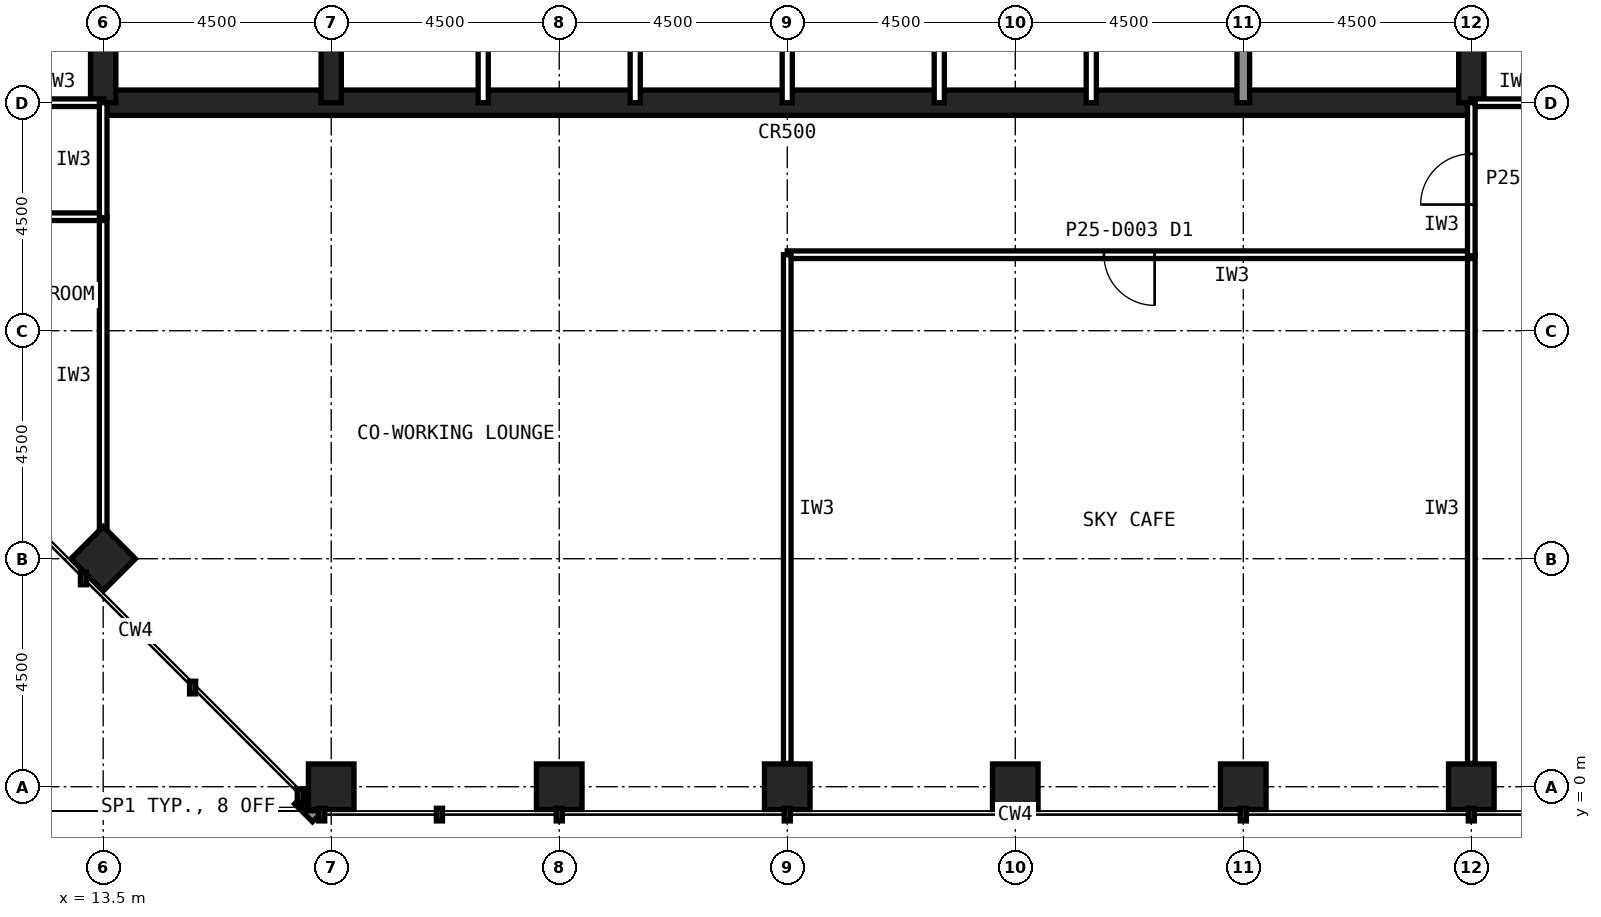
"""IFC4 building model, lengths in metres.
Left out: names, types, materials, properties, quantities, classifications, styles, units other than length and angle.
Written with IfcOpenShell. Run it as: python <this file> out.ifc"""

import sys

from ifc_helpers import new_model, si_unit, direction, frame, frame_2d, origin, origin_2d, place, context, subcontext, project, spatial, rectangle, hollow_rectangle, extrude, element, fill, save


model = new_model("IFC4")
c1 = context("Model", 3, precision=1e-05, world=origin(), true_north=direction((0.0, 1.0)))
c2 = subcontext(c1, "Body", "Model", "MODEL_VIEW")
j1 = project(units=[si_unit("LENGTHUNIT", "METRE"), si_unit("PLANEANGLEUNIT", "RADIAN")], contexts=[c1])
p1 = place(None, origin())
s1 = spatial("IfcSite", under=j1, at=p1, CompositionType="ELEMENT")
p2 = place(p1, origin())
s2 = spatial("IfcBuilding", under=s1, at=p2, CompositionType="ELEMENT")
p3 = place(p2, frame((0.0, 0.0, 110.6)))
s3 = spatial("IfcBuildingStorey", under=s2, at=p3, CompositionType="ELEMENT", Elevation=110.6)
for number, where, z_axis, x_axis in (
    (1, (18.0, 0.0, 0.0), (0.0, 0.0, 1.0), (1.0, 0.0, 0.0)),
    (2, (22.5, 0.0, 0.0), (0.0, 0.0, 1.0), (1.0, 0.0, 0.0)),
    (3, (27.0, 0.0, 0.0), (0.0, 0.0, 1.0), (1.0, 0.0, 0.0)),
    (4, (31.5, 0.0, 0.0), (0.0, 0.0, 1.0), (1.0, 0.0, 0.0)),
    (5, (36.0, 0.0, 0.0), (0.0, 0.0, 1.0), (1.0, 0.0, 0.0)),
    (6, (40.5, 0.0, 0.0), (0.0, 0.0, 1.0), (1.0, 0.0, 0.0)),
    (7, (13.5, 4.5, 0.0), (0.0, 0.0, 1.0), (0.707, 0.707, 0.0)),
):
    element("IfcColumn", number, at=place(p3, frame(where, z_axis=z_axis, x_axis=x_axis)), inside=s3, PredefinedType="COLUMN", context=c2, shape_type="SweptSolid", body=[
        extrude(hollow_rectangle(XDim=0.9, YDim=0.9, WallThickness=0.063, at=origin_2d()), origin(), (0.0, 0.0, 1.0), 5.0),
    ])
p4 = place(p3, frame((13.5, 13.5, 0.0), z_axis=(0.0, 0.0, 1.0), x_axis=(1.0, 0.0, 0.0)))
e8 = element("IfcWall", 8, at=p4, inside=s3, PredefinedType="SHEAR", context=c2, shape_type="SweptSolid", body=[
    extrude(rectangle(XDim=27.0, YDim=0.5, at=frame_2d((13.5, 0.0))), origin(), (0.0, 0.0, 1.0), 5.0),
])
p5 = place(p3, frame((40.5, 13.5, 0.0), z_axis=(0.0, 0.0, 1.0), x_axis=(0.0, 1.0, 0.0)))
e9 = element("IfcWall", 9, at=p5, inside=s3, PredefinedType="SHEAR", context=c2, shape_type="SweptSolid", body=[
    extrude(rectangle(XDim=27.0, YDim=0.5, at=frame_2d((13.5, 0.0))), origin(), (0.0, 0.0, 1.0), 5.0),
])
p6 = place(p5, frame((5.85, 0.0, 0.0)))
e10 = element("IfcOpeningElement", 10, at=p6, cuts=e9, PredefinedType="OPENING", context=c2, shape_type="SweptSolid", body=[
    extrude(rectangle(XDim=1.8, YDim=2.1, at=frame_2d((0.9, 1.05))), frame((0.0, 0.26, 0.0), z_axis=(0.0, -1.0, 0.0), x_axis=(1.0, 0.0, 0.0)), (0.0, 0.0, 1.0), 0.52),
])
p7 = place(p5, frame((19.65, 0.0, 0.0)))
e11 = element("IfcOpeningElement", 11, at=p7, cuts=e9, PredefinedType="OPENING", context=c2, shape_type="SweptSolid", body=[
    extrude(rectangle(XDim=1.2, YDim=2.1, at=frame_2d((0.6, 1.05))), frame((0.0, 0.26, 0.0), z_axis=(0.0, -1.0, 0.0), x_axis=(1.0, 0.0, 0.0)), (0.0, 0.0, 1.0), 0.52),
])
p8 = place(p3, frame((13.5, 40.5, 0.0), z_axis=(0.0, 0.0, 1.0), x_axis=(0.0, -1.0, 0.0)))
e12 = element("IfcWall", 12, at=p8, inside=s3, PredefinedType="SHEAR", context=c2, shape_type="SweptSolid", body=[
    extrude(rectangle(XDim=27.0, YDim=0.5, at=frame_2d((13.5, 0.0))), origin(), (0.0, 0.0, 1.0), 5.0),
])
p9 = place(p8, frame((19.65, 0.0, 0.0)))
e13 = element("IfcOpeningElement", 13, at=p9, cuts=e12, PredefinedType="OPENING", context=c2, shape_type="SweptSolid", body=[
    extrude(rectangle(XDim=1.2, YDim=2.1, at=frame_2d((0.6, 1.05))), frame((0.0, 0.26, 0.0), z_axis=(0.0, -1.0, 0.0), x_axis=(1.0, 0.0, 0.0)), (0.0, 0.0, 1.0), 0.52),
])
p10 = place(p8, frame((5.85, 0.0, 0.0)))
e14 = element("IfcOpeningElement", 14, at=p10, cuts=e12, PredefinedType="OPENING", context=c2, shape_type="SweptSolid", body=[
    extrude(rectangle(XDim=1.8, YDim=2.1, at=frame_2d((0.9, 1.05))), frame((0.0, 0.26, 0.0), z_axis=(0.0, -1.0, 0.0), x_axis=(1.0, 0.0, 0.0)), (0.0, 0.0, 1.0), 0.52),
])
p11 = place(p3, frame((18.0, 13.5, 0.0), z_axis=(0.0, 0.0, 1.0), x_axis=(0.0, 1.0, 0.0)))
e15 = element("IfcWall", 15, at=p11, inside=s3, PredefinedType="SHEAR", context=c2, shape_type="SweptSolid", body=[
    extrude(rectangle(XDim=18.0, YDim=0.4, at=frame_2d((9.0, 0.0))), origin(), (0.0, 0.0, 1.0), 5.0),
])
p12 = place(p3, frame((36.0, 13.5, 0.0), z_axis=(0.0, 0.0, 1.0), x_axis=(0.0, 1.0, 0.0)))
e16 = element("IfcWall", 16, at=p12, inside=s3, PredefinedType="SOLIDWALL", context=c2, shape_type="SweptSolid", body=[
    extrude(rectangle(XDim=4.5, YDim=0.25, at=frame_2d((2.25, 0.0))), origin(), (0.0, 0.0, 1.0), 4.84),
])
for number, where, z_axis, x_axis in (
    (17, (21.0, 13.5, 0.0), (0.0, 0.0, 1.0), (0.0, 1.0, 0.0)),
    (18, (24.0, 13.5, 0.0), (0.0, 0.0, 1.0), (0.0, 1.0, 0.0)),
    (19, (27.0, 13.5, 0.0), (0.0, 0.0, 1.0), (0.0, 1.0, 0.0)),
    (20, (30.0, 13.5, 0.0), (0.0, 0.0, 1.0), (0.0, 1.0, 0.0)),
    (21, (33.0, 13.5, 0.0), (0.0, 0.0, 1.0), (0.0, 1.0, 0.0)),
):
    element("IfcWall", number, at=place(p3, frame(where, z_axis=z_axis, x_axis=x_axis)), inside=s3, PredefinedType="PARTITIONING", context=c2, shape_type="SweptSolid", body=[
        extrude(rectangle(XDim=4.5, YDim=0.2, at=frame_2d((2.25, 0.0))), origin(), (0.0, 0.0, 1.0), 4.84),
    ])
for number, where, z_axis, x_axis in (
    (22, (11.7, 13.5, 0.0), (0.0, 0.0, 1.0), (1.0, 0.0, 0.0)),
    (23, (40.49, 13.5, 0.0), (0.0, 0.0, 1.0), (1.0, 0.0, 0.0)),
):
    element("IfcWall", number, at=place(p3, frame(where, z_axis=z_axis, x_axis=x_axis)), inside=s3, PredefinedType="PARTITIONING", context=c2, shape_type="SweptSolid", body=[
        extrude(rectangle(XDim=1.81, YDim=0.15, at=frame_2d((0.905, 0.0))), origin(), (0.0, 0.0, 1.0), 3.989),
    ])
p13 = place(p3, frame((40.5, 0.46, 0.0), z_axis=(0.0, 0.0, 1.0), x_axis=(0.0, 1.0, 0.0)))
e24 = element("IfcWall", 24, at=p13, inside=s3, PredefinedType="PARTITIONING", context=c2, shape_type="SweptSolid", body=[
    extrude(rectangle(XDim=10.04, YDim=0.15, at=frame_2d((5.02, 0.0))), origin(), (0.0, 0.0, 1.0), 3.989),
])
p14 = place(p3, frame((40.5, 10.5, 0.0), z_axis=(0.0, 0.0, 1.0), x_axis=(-1.0, 0.0, 0.0)))
e25 = element("IfcWall", 25, at=p14, inside=s3, PredefinedType="PARTITIONING", context=c2, shape_type="SweptSolid", body=[
    extrude(rectangle(XDim=13.5, YDim=0.15, at=frame_2d((6.75, 0.0))), origin(), (0.0, 0.0, 1.0), 4.84),
])
p15 = place(p14, frame((6.25, 0.0, 0.0)))
e26 = element("IfcOpeningElement", 26, at=p15, cuts=e25, PredefinedType="OPENING", context=c2, shape_type="SweptSolid", body=[
    extrude(rectangle(XDim=1.0, YDim=2.1, at=frame_2d((0.5, 1.05))), frame((0.0, 0.085, 0.0), z_axis=(0.0, -1.0, 0.0), x_axis=(1.0, 0.0, 0.0)), (0.0, 0.0, 1.0), 0.17),
])
p16 = place(p3, frame((27.0, 10.5, 0.0), z_axis=(0.0, 0.0, 1.0), x_axis=(0.0, -1.0, 0.0)))
e27 = element("IfcWall", 27, at=p16, inside=s3, PredefinedType="PARTITIONING", context=c2, shape_type="SweptSolid", body=[
    extrude(rectangle(XDim=10.04, YDim=0.15, at=frame_2d((5.02, 0.0))), origin(), (0.0, 0.0, 1.0), 3.989),
])
p17 = place(p3, frame((13.5, 4.96, 0.0), z_axis=(0.0, 0.0, 1.0), x_axis=(0.0, 1.0, 0.0)))
e28 = element("IfcWall", 28, at=p17, inside=s3, PredefinedType="PARTITIONING", context=c2, shape_type="SweptSolid", body=[
    extrude(rectangle(XDim=6.29, YDim=0.15, at=frame_2d((3.145, 0.0))), origin(), (0.0, 0.0, 1.0), 3.989),
])
p18 = place(p3, frame((13.5, 11.25, 0.0), z_axis=(0.0, 0.0, 1.0), x_axis=(-1.0, 0.0, 0.0)))
e29 = element("IfcWall", 29, at=p18, inside=s3, PredefinedType="PARTITIONING", context=c2, shape_type="SweptSolid", body=[
    extrude(rectangle(XDim=7.485, YDim=0.15, at=frame_2d((3.743, 0.0))), origin(), (0.0, 0.0, 1.0), 4.84),
])
p19 = place(p18, frame((2.868, 0.0, 0.0)))
e30 = element("IfcOpeningElement", 30, at=p19, cuts=e29, PredefinedType="OPENING", context=c2, shape_type="SweptSolid", body=[
    extrude(rectangle(XDim=1.0, YDim=2.1, at=frame_2d((0.5, 1.05))), frame((0.0, 0.085, 0.0), z_axis=(0.0, -1.0, 0.0), x_axis=(1.0, 0.0, 0.0)), (0.0, 0.0, 1.0), 0.17),
])
p20 = place(p3, frame((40.5, 10.48, 0.0), z_axis=(0.0, 0.0, 1.0), x_axis=(0.0, 1.0, 0.0)))
e31 = element("IfcWall", 31, at=p20, inside=s3, PredefinedType="PARTITIONING", context=c2, shape_type="SweptSolid", body=[
    extrude(rectangle(XDim=3.02, YDim=0.15, at=frame_2d((1.51, 0.0))), origin(), (0.0, 0.0, 1.0), 3.989),
])
p21 = place(p20, frame((1.01, 0.0, 0.0)))
e32 = element("IfcOpeningElement", 32, at=p21, cuts=e31, PredefinedType="OPENING", context=c2, shape_type="SweptSolid", body=[
    extrude(rectangle(XDim=1.0, YDim=2.1, at=frame_2d((0.5, 1.05))), frame((0.0, 0.085, 0.0), z_axis=(0.0, -1.0, 0.0), x_axis=(1.0, 0.0, 0.0)), (0.0, 0.0, 1.0), 0.17),
])
p22 = place(p3, frame((13.5, 11.23, 0.0), z_axis=(0.0, 0.0, 1.0), x_axis=(0.0, 1.0, 0.0)))
e33 = element("IfcWall", 33, at=p22, inside=s3, PredefinedType="PARTITIONING", context=c2, shape_type="SweptSolid", body=[
    extrude(rectangle(XDim=2.27, YDim=0.15, at=frame_2d((1.135, 0.0))), origin(), (0.0, 0.0, 1.0), 3.989),
])
p23 = place(p15, origin())
e34 = element("IfcDoor", 34, at=p23, inside=s3, OperationType="SINGLE_SWING_LEFT", PredefinedType="DOOR", context=c2, shape_type="SweptSolid", body=[
    extrude(rectangle(XDim=1.0, YDim=2.1, at=frame_2d((0.5, 1.05))), frame((0.0, 0.025, 0.0), z_axis=(0.0, -1.0, 0.0), x_axis=(1.0, 0.0, 0.0)), (0.0, 0.0, 1.0), 0.05),
])
fill(e26, e34)
p24 = place(p21, origin())
e35 = element("IfcDoor", 35, at=p24, inside=s3, OperationType="SINGLE_SWING_LEFT", PredefinedType="DOOR", context=c2, shape_type="SweptSolid", body=[
    extrude(rectangle(XDim=1.0, YDim=2.1, at=frame_2d((0.5, 1.05))), frame((0.0, 0.025, 0.0), z_axis=(0.0, -1.0, 0.0), x_axis=(1.0, 0.0, 0.0)), (0.0, 0.0, 1.0), 0.05),
])
fill(e32, e35)
save(model, sys.argv[1])
